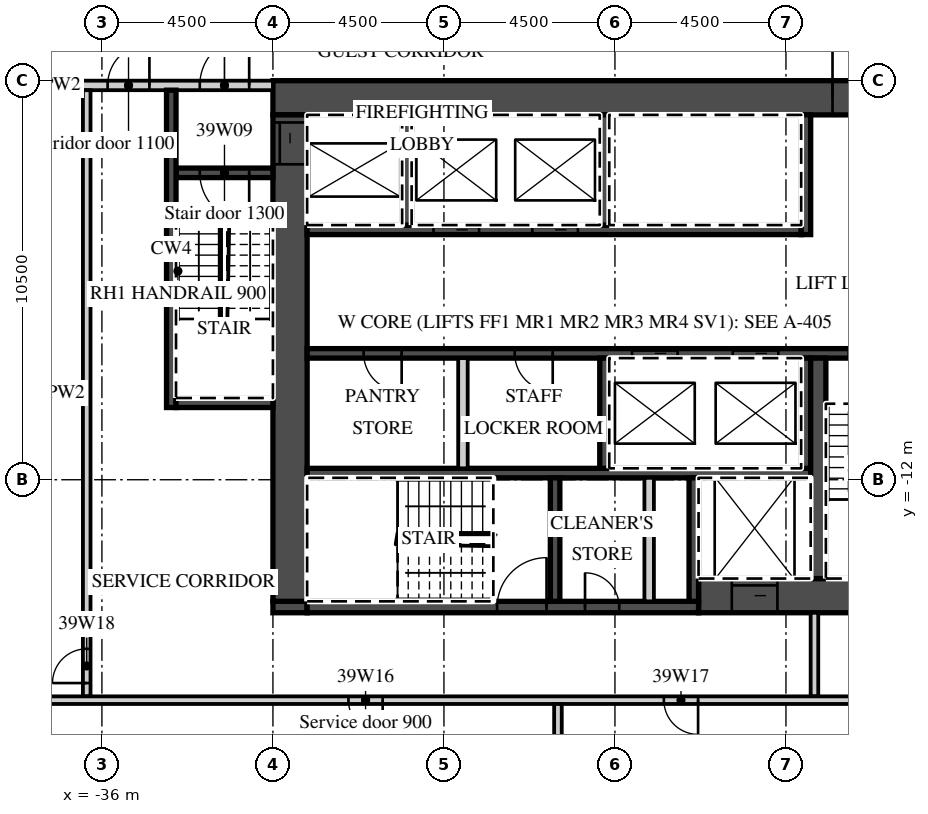
"""IFC4 building model, lengths in metres.
Left out: names, types, materials, properties, quantities, classifications, styles, units other than length and angle.
Written with IfcOpenShell. Run it as: python <this file> out.ifc"""

import sys

from ifc_helpers import new_model, si_unit, direction, frame, frame_2d, origin, place, context, subcontext, project, spatial, rectangle, extrude, element, fill, save


model = new_model("IFC4")
c1 = context("Model", 3, precision=1e-05, world=origin(), true_north=direction((0.0, 1.0)))
c2 = subcontext(c1, "Body", "Model", "MODEL_VIEW")
j1 = project(units=[si_unit("LENGTHUNIT", "METRE"), si_unit("PLANEANGLEUNIT", "RADIAN")], contexts=[c1])
p1 = place(None, origin())
s1 = spatial("IfcSite", under=j1, at=p1, CompositionType="ELEMENT")
p2 = place(p1, origin())
s2 = spatial("IfcBuilding", under=s1, at=p2, CompositionType="ELEMENT")
p3 = place(p2, frame((0.0, 0.0, 170.2)))
s3 = spatial("IfcBuildingStorey", under=s2, at=p3, CompositionType="ELEMENT", Elevation=170.2)
p4 = place(p3, frame((-31.5, -1.95, 0.0), z_axis=(0.0, 0.0, 1.0), x_axis=(1.0, 0.0, 0.0)))
e1 = element("IfcWall", 1, at=p4, inside=s3, PredefinedType="SHEAR", context=c2, shape_type="SweptSolid", body=[
    extrude(rectangle(XDim=18.0, YDim=0.9, at=frame_2d((9.0, 0.0))), origin(), (0.0, 0.0, 1.0), 3.02),
])
p5 = place(p4, frame((14.725, 0.0, 0.0)))
e2 = element("IfcOpeningElement", 2, at=p5, cuts=e1, PredefinedType="OPENING", context=c2, shape_type="SweptSolid", body=[
    extrude(rectangle(XDim=1.8, YDim=2.1, at=frame_2d((0.9, 1.05))), frame((0.0, 0.46, 0.0), z_axis=(0.0, -1.0, 0.0), x_axis=(1.0, 0.0, 0.0)), (0.0, 0.0, 1.0), 0.92),
])
p6 = place(p3, frame((-20.3, -15.05, 0.0), z_axis=(0.0, 0.0, 1.0), x_axis=(1.0, 0.0, 0.0)))
e3 = element("IfcWall", 3, at=p6, inside=s3, PredefinedType="SHEAR", context=c2, shape_type="SweptSolid", body=[
    extrude(rectangle(XDim=6.8, YDim=0.9, at=frame_2d((3.4, 0.0))), origin(), (0.0, 0.0, 1.0), 3.02),
])
p7 = place(p6, frame((0.875, 0.0, 0.0)))
e4 = element("IfcOpeningElement", 4, at=p7, cuts=e3, PredefinedType="OPENING", context=c2, shape_type="SweptSolid", body=[
    extrude(rectangle(XDim=1.2, YDim=2.1, at=frame_2d((0.6, 1.05))), frame((0.0, 0.46, 0.0), z_axis=(0.0, -1.0, 0.0), x_axis=(1.0, 0.0, 0.0)), (0.0, 0.0, 1.0), 0.92),
])
p8 = place(p3, frame((-31.5, -15.35, 0.0), z_axis=(0.0, 0.0, 1.0), x_axis=(1.0, 0.0, 0.0)))
e5 = element("IfcWall", 5, at=p8, inside=s3, PredefinedType="SHEAR", context=c2, shape_type="SweptSolid", body=[
    extrude(rectangle(XDim=0.9, YDim=0.3, at=frame_2d((0.45, 0.0))), origin(), (0.0, 0.0, 1.0), 3.02),
])
p9 = place(p3, frame((-30.6, -15.35, 0.0), z_axis=(0.0, 0.0, 1.0), x_axis=(1.0, 0.0, 0.0)))
e6 = element("IfcWall", 6, at=p9, inside=s3, PredefinedType="SHEAR", context=c2, shape_type="SweptSolid", body=[
    extrude(rectangle(XDim=10.3, YDim=0.3, at=frame_2d((5.15, 0.0))), origin(), (0.0, 0.0, 1.0), 3.02),
])
p10 = place(p9, frame((5.0, 0.0, 0.0)))
e7 = element("IfcOpeningElement", 7, at=p10, cuts=e6, PredefinedType="OPENING", context=c2, shape_type="SweptSolid", body=[
    extrude(rectangle(XDim=1.3, YDim=2.1, at=frame_2d((0.65, 1.05))), frame((0.0, 0.16, 0.0), z_axis=(0.0, -1.0, 0.0), x_axis=(1.0, 0.0, 0.0)), (0.0, 0.0, 1.0), 0.32),
])
p11 = place(p9, frame((7.312, 0.0, 0.0)))
e8 = element("IfcOpeningElement", 8, at=p11, cuts=e6, PredefinedType="OPENING", context=c2, shape_type="SweptSolid", body=[
    extrude(rectangle(XDim=0.9, YDim=2.1, at=frame_2d((0.45, 1.05))), frame((0.0, 0.16, 0.0), z_axis=(0.0, -1.0, 0.0), x_axis=(1.0, 0.0, 0.0)), (0.0, 0.0, 1.0), 0.32),
])
p12 = place(p3, frame((-31.05, -15.2, 0.0), z_axis=(0.0, 0.0, 1.0), x_axis=(0.0, 1.0, 0.0)))
e9 = element("IfcWall", 9, at=p12, inside=s3, PredefinedType="SHEAR", context=c2, shape_type="SweptSolid", body=[
    extrude(rectangle(XDim=12.8, YDim=0.9, at=frame_2d((6.4, 0.0))), origin(), (0.0, 0.0, 1.0), 3.02),
])
p13 = place(p12, frame((11.5, 0.0, 0.0)))
e10 = element("IfcOpeningElement", 10, at=p13, cuts=e9, PredefinedType="OPENING", context=c2, shape_type="SweptSolid", body=[
    extrude(rectangle(XDim=1.1, YDim=2.1, at=frame_2d((0.55, 1.05))), frame((0.0, 0.46, 0.0), z_axis=(0.0, -1.0, 0.0), x_axis=(1.0, 0.0, 0.0)), (0.0, 0.0, 1.0), 0.92),
])
p14 = place(p3, frame((-30.6, -5.425, 0.0), z_axis=(0.0, 0.0, 1.0), x_axis=(1.0, 0.0, 0.0)))
e11 = element("IfcWall", 11, at=p14, inside=s3, PredefinedType="SHEAR", context=c2, shape_type="SweptSolid", body=[
    extrude(rectangle(XDim=13.0, YDim=0.25, at=frame_2d((6.5, 0.0))), origin(), (0.0, 0.0, 1.0), 3.02),
])
p15 = place(p14, frame((3.325, 0.0, 0.0)))
e12 = element("IfcOpeningElement", 12, at=p15, cuts=e11, PredefinedType="OPENING", context=c2, shape_type="SweptSolid", body=[
    extrude(rectangle(XDim=1.2, YDim=2.1, at=frame_2d((0.6, 1.05))), frame((0.0, 0.135, 0.0), z_axis=(0.0, -1.0, 0.0), x_axis=(1.0, 0.0, 0.0)), (0.0, 0.0, 1.0), 0.27),
])
p16 = place(p14, frame((5.925, 0.0, 0.0)))
e13 = element("IfcOpeningElement", 13, at=p16, cuts=e11, PredefinedType="OPENING", context=c2, shape_type="SweptSolid", body=[
    extrude(rectangle(XDim=1.2, YDim=2.1, at=frame_2d((0.6, 1.05))), frame((0.0, 0.135, 0.0), z_axis=(0.0, -1.0, 0.0), x_axis=(1.0, 0.0, 0.0)), (0.0, 0.0, 1.0), 0.27),
])
p17 = place(p3, frame((-17.475, -5.55, 0.0), z_axis=(0.0, 0.0, 1.0), x_axis=(0.0, 1.0, 0.0)))
e14 = element("IfcWall", 14, at=p17, inside=s3, PredefinedType="SHEAR", context=c2, shape_type="SweptSolid", body=[
    extrude(rectangle(XDim=3.15, YDim=0.25, at=frame_2d((1.575, 0.0))), origin(), (0.0, 0.0, 1.0), 3.02),
])
for number, where, z_axis, x_axis in (
    (15, (-27.975, -5.3, 0.0), (0.0, 0.0, 1.0), (0.0, 1.0, 0.0)),
    (16, (-22.775, -5.3, 0.0), (0.0, 0.0, 1.0), (0.0, 1.0, 0.0)),
):
    element("IfcWall", number, at=place(p3, frame(where, z_axis=z_axis, x_axis=x_axis)), inside=s3, PredefinedType="SHEAR", context=c2, shape_type="SweptSolid", body=[
        extrude(rectangle(XDim=2.9, YDim=0.25, at=frame_2d((1.45, 0.0))), origin(), (0.0, 0.0, 1.0), 3.02),
    ])
p18 = place(p3, frame((-30.6, -8.675, 0.0), z_axis=(0.0, 0.0, 1.0), x_axis=(1.0, 0.0, 0.0)))
e17 = element("IfcWall", 17, at=p18, inside=s3, PredefinedType="SHEAR", context=c2, shape_type="SweptSolid", body=[
    extrude(rectangle(XDim=16.2, YDim=0.25, at=frame_2d((8.1, 0.0))), origin(), (0.0, 0.0, 1.0), 3.02),
])
p19 = place(p18, frame((8.55, 0.0, 0.0)))
e18 = element("IfcOpeningElement", 18, at=p19, cuts=e17, PredefinedType="OPENING", context=c2, shape_type="SweptSolid", body=[
    extrude(rectangle(XDim=1.2, YDim=2.1, at=frame_2d((0.6, 1.05))), frame((0.0, 0.135, 0.0), z_axis=(0.0, -1.0, 0.0), x_axis=(1.0, 0.0, 0.0)), (0.0, 0.0, 1.0), 0.27),
])
p20 = place(p18, frame((11.2, 0.0, 0.0)))
e19 = element("IfcOpeningElement", 19, at=p20, cuts=e17, PredefinedType="OPENING", context=c2, shape_type="SweptSolid", body=[
    extrude(rectangle(XDim=1.2, YDim=2.1, at=frame_2d((0.6, 1.05))), frame((0.0, 0.135, 0.0), z_axis=(0.0, -1.0, 0.0), x_axis=(1.0, 0.0, 0.0)), (0.0, 0.0, 1.0), 0.27),
])
p21 = place(p18, frame((14.25, 0.0, 0.0)))
e20 = element("IfcOpeningElement", 20, at=p21, cuts=e17, PredefinedType="OPENING", context=c2, shape_type="SweptSolid", body=[
    extrude(rectangle(XDim=1.3, YDim=2.1, at=frame_2d((0.65, 1.05))), frame((0.0, 0.135, 0.0), z_axis=(0.0, -1.0, 0.0), x_axis=(1.0, 0.0, 0.0)), (0.0, 0.0, 1.0), 0.27),
])
p22 = place(p18, frame((1.488, 0.0, 0.0)))
e21 = element("IfcOpeningElement", 21, at=p22, cuts=e17, PredefinedType="OPENING", context=c2, shape_type="SweptSolid", body=[
    extrude(rectangle(XDim=1.0, YDim=2.1, at=frame_2d((0.5, 1.05))), frame((0.0, 0.135, 0.0), z_axis=(0.0, -1.0, 0.0), x_axis=(1.0, 0.0, 0.0)), (0.0, 0.0, 1.0), 0.27),
])
p23 = place(p18, frame((5.462, 0.0, 0.0)))
e22 = element("IfcOpeningElement", 22, at=p23, cuts=e17, PredefinedType="OPENING", context=c2, shape_type="SweptSolid", body=[
    extrude(rectangle(XDim=1.0, YDim=2.1, at=frame_2d((0.5, 1.05))), frame((0.0, 0.135, 0.0), z_axis=(0.0, -1.0, 0.0), x_axis=(1.0, 0.0, 0.0)), (0.0, 0.0, 1.0), 0.27),
])
p24 = place(p3, frame((-30.6, -11.825, 0.0), z_axis=(0.0, 0.0, 1.0), x_axis=(1.0, 0.0, 0.0)))
e23 = element("IfcWall", 23, at=p24, inside=s3, PredefinedType="SHEAR", context=c2, shape_type="SweptSolid", body=[
    extrude(rectangle(XDim=13.25, YDim=0.25, at=frame_2d((6.625, 0.0))), origin(), (0.0, 0.0, 1.0), 3.02),
])
for number, where, z_axis, x_axis in (
    (24, (-17.475, -11.7, 0.0), (0.0, 0.0, 1.0), (0.0, 1.0, 0.0)),
    (25, (-22.775, -11.7, 0.0), (0.0, 0.0, 1.0), (0.0, 1.0, 0.0)),
):
    element("IfcWall", number, at=place(p3, frame(where, z_axis=z_axis, x_axis=x_axis)), inside=s3, PredefinedType="SHEAR", context=c2, shape_type="SweptSolid", body=[
        extrude(rectangle(XDim=2.9, YDim=0.25, at=frame_2d((1.45, 0.0))), origin(), (0.0, 0.0, 1.0), 3.02),
    ])
p25 = place(p3, frame((-26.5, -11.7, 0.0), z_axis=(0.0, 0.0, 1.0), x_axis=(0.0, 1.0, 0.0)))
e26 = element("IfcWall", 26, at=p25, inside=s3, PredefinedType="PARTITIONING", context=c2, shape_type="SweptSolid", body=[
    extrude(rectangle(XDim=2.9, YDim=0.25, at=frame_2d((1.45, 0.0))), origin(), (0.0, 0.0, 1.0), 3.02),
])
p26 = place(p3, frame((-17.15, -14.6, 0.0), z_axis=(0.0, 0.0, 1.0), x_axis=(0.0, 1.0, 0.0)))
e27 = element("IfcWall", 27, at=p26, inside=s3, PredefinedType="SHEAR", context=c2, shape_type="SweptSolid", body=[
    extrude(rectangle(XDim=5.8, YDim=0.4, at=frame_2d((2.9, 0.0))), origin(), (0.0, 0.0, 1.0), 3.02),
])
for number, where, z_axis, x_axis in (
    (28, (-20.425, -15.2, 0.0), (0.0, 0.0, 1.0), (0.0, 1.0, 0.0)),
    (29, (-24.075, -15.2, 0.0), (0.0, 0.0, 1.0), (0.0, 1.0, 0.0)),
):
    element("IfcWall", number, at=place(p3, frame(where, z_axis=z_axis, x_axis=x_axis)), inside=s3, PredefinedType="SHEAR", context=c2, shape_type="SweptSolid", body=[
        extrude(rectangle(XDim=3.25, YDim=0.25, at=frame_2d((1.625, 0.0))), origin(), (0.0, 0.0, 1.0), 3.02),
    ])
p27 = place(p3, frame((-21.6, -15.2, 0.0), z_axis=(0.0, 0.0, 1.0), x_axis=(0.0, 1.0, 0.0)))
e30 = element("IfcWall", 30, at=p27, inside=s3, PredefinedType="PARTITIONING", context=c2, shape_type="SweptSolid", body=[
    extrude(rectangle(XDim=3.25, YDim=0.25, at=frame_2d((1.625, 0.0))), origin(), (0.0, 0.0, 1.0), 3.02),
])
p28 = place(p3, frame((-42.632, -1.625, 0.0), z_axis=(0.0, 0.0, 1.0), x_axis=(1.0, 0.0, 0.0)))
e31 = element("IfcWall", 31, at=p28, inside=s3, PredefinedType="PARTITIONING", context=c2, shape_type="SweptSolid", body=[
    extrude(rectangle(XDim=11.132, YDim=0.25, at=frame_2d((5.566, 0.0))), origin(), (0.0, 0.0, 1.0), 3.02),
])
p29 = place(p28, frame((9.207, 0.0, 0.0)))
e32 = element("IfcOpeningElement", 32, at=p29, cuts=e31, PredefinedType="OPENING", context=c2, shape_type="SweptSolid", body=[
    extrude(rectangle(XDim=1.3, YDim=2.1, at=frame_2d((0.65, 1.05))), frame((0.0, 0.135, 0.0), z_axis=(0.0, -1.0, 0.0), x_axis=(1.0, 0.0, 0.0)), (0.0, 0.0, 1.0), 0.27),
])
p30 = place(p28, frame((6.781, 0.0, 0.0)))
e33 = element("IfcOpeningElement", 33, at=p30, cuts=e31, PredefinedType="OPENING", context=c2, shape_type="SweptSolid", body=[
    extrude(rectangle(XDim=1.1, YDim=2.1, at=frame_2d((0.55, 1.05))), frame((0.0, 0.135, 0.0), z_axis=(0.0, -1.0, 0.0), x_axis=(1.0, 0.0, 0.0)), (0.0, 0.0, 1.0), 0.27),
])
p31 = place(p3, frame((-34.05, -3.925, 0.0), z_axis=(0.0, 0.0, 1.0), x_axis=(1.0, 0.0, 0.0)))
e34 = element("IfcWall", 34, at=p31, inside=s3, PredefinedType="SHEAR", context=c2, shape_type="SweptSolid", body=[
    extrude(rectangle(XDim=2.55, YDim=0.25, at=frame_2d((1.275, 0.0))), origin(), (0.0, 0.0, 1.0), 3.02),
])
p32 = place(p31, frame((0.625, 0.0, 0.0)))
e35 = element("IfcOpeningElement", 35, at=p32, cuts=e34, PredefinedType="OPENING", context=c2, shape_type="SweptSolid", body=[
    extrude(rectangle(XDim=1.3, YDim=2.1, at=frame_2d((0.65, 1.05))), frame((0.0, 0.135, 0.0), z_axis=(0.0, -1.0, 0.0), x_axis=(1.0, 0.0, 0.0)), (0.0, 0.0, 1.0), 0.27),
])
p33 = place(p3, frame((-34.175, -10.1, 0.0), z_axis=(0.0, 0.0, 1.0), x_axis=(0.0, 1.0, 0.0)))
e36 = element("IfcWall", 36, at=p33, inside=s3, PredefinedType="SHEAR", context=c2, shape_type="SweptSolid", body=[
    extrude(rectangle(XDim=8.35, YDim=0.25, at=frame_2d((4.175, 0.0))), origin(), (0.0, 0.0, 1.0), 3.02),
])
p34 = place(p3, frame((-34.05, -9.975, 0.0), z_axis=(0.0, 0.0, 1.0), x_axis=(1.0, 0.0, 0.0)))
e37 = element("IfcWall", 37, at=p34, inside=s3, PredefinedType="SHEAR", context=c2, shape_type="SweptSolid", body=[
    extrude(rectangle(XDim=2.55, YDim=0.25, at=frame_2d((1.275, 0.0))), origin(), (0.0, 0.0, 1.0), 3.02),
])
p35 = place(p3, frame((-17.25, -17.7, 0.0), z_axis=(0.0, 0.0, 1.0), x_axis=(0.0, 1.0, 0.0)))
e38 = element("IfcWall", 38, at=p35, inside=s3, PredefinedType="PARTITIONING", context=c2, shape_type="SweptSolid", body=[
    extrude(rectangle(XDim=2.2, YDim=0.2, at=frame_2d((1.1, 0.0))), origin(), (0.0, 0.0, 1.0), 3.02),
])
p36 = place(p3, frame((-36.4, -17.7, 0.0), z_axis=(0.0, 0.0, 1.0), x_axis=(0.0, 1.0, 0.0)))
e39 = element("IfcWall", 39, at=p36, inside=s3, PredefinedType="PARTITIONING", context=c2, shape_type="SweptSolid", body=[
    extrude(rectangle(XDim=15.95, YDim=0.2, at=frame_2d((7.975, 0.0))), origin(), (0.0, 0.0, 1.0), 3.02),
])
p37 = place(p36, frame((0.35, 0.0, 0.0)))
e40 = element("IfcOpeningElement", 40, at=p37, cuts=e39, PredefinedType="OPENING", context=c2, shape_type="SweptSolid", body=[
    extrude(rectangle(XDim=0.9, YDim=2.1, at=frame_2d((0.45, 1.05))), frame((0.0, 0.11, 0.0), z_axis=(0.0, -1.0, 0.0), x_axis=(1.0, 0.0, 0.0)), (0.0, 0.0, 1.0), 0.22),
])
p38 = place(p3, frame((-41.074, -17.8, 0.0), z_axis=(0.0, 0.0, 1.0), x_axis=(1.0, 0.0, 0.0)))
e41 = element("IfcWall", 41, at=p38, inside=s3, PredefinedType="PARTITIONING", context=c2, shape_type="SweptSolid", body=[
    extrude(rectangle(XDim=27.474, YDim=0.2, at=frame_2d((13.737, 0.0))), origin(), (0.0, 0.0, 1.0), 3.02),
])
p39 = place(p38, frame((11.562, 0.0, 0.0)))
e42 = element("IfcOpeningElement", 42, at=p39, cuts=e41, PredefinedType="OPENING", context=c2, shape_type="SweptSolid", body=[
    extrude(rectangle(XDim=0.9, YDim=2.1, at=frame_2d((0.45, 1.05))), frame((0.0, 0.11, 0.0), z_axis=(0.0, -1.0, 0.0), x_axis=(1.0, 0.0, 0.0)), (0.0, 0.0, 1.0), 0.22),
])
p40 = place(p38, frame((19.862, 0.0, 0.0)))
e43 = element("IfcOpeningElement", 43, at=p40, cuts=e41, PredefinedType="OPENING", context=c2, shape_type="SweptSolid", body=[
    extrude(rectangle(XDim=0.9, YDim=2.1, at=frame_2d((0.45, 1.05))), frame((0.0, 0.11, 0.0), z_axis=(0.0, -1.0, 0.0), x_axis=(1.0, 0.0, 0.0)), (0.0, 0.0, 1.0), 0.22),
])
p41 = place(p3, frame((-24.0, -23.312, 0.0), z_axis=(0.0, 0.0, 1.0), x_axis=(0.0, 1.0, 0.0)))
e44 = element("IfcWall", 44, at=p41, inside=s3, PredefinedType="PARTITIONING", context=c2, shape_type="SweptSolid", body=[
    extrude(rectangle(XDim=5.413, YDim=0.2, at=frame_2d((2.706, 0.0))), origin(), (0.0, 0.0, 1.0), 3.02),
])
p42 = place(p19, origin())
e45 = element("IfcDoor", 45, at=p42, inside=s3, OperationType="SLIDING_TO_LEFT", PredefinedType="DOOR", context=c2, shape_type="SweptSolid", body=[
    extrude(rectangle(XDim=1.2, YDim=2.1, at=frame_2d((0.6, 1.05))), frame((0.0, 0.025, 0.0), z_axis=(0.0, -1.0, 0.0), x_axis=(1.0, 0.0, 0.0)), (0.0, 0.0, 1.0), 0.05),
])
fill(e18, e45)
p43 = place(p20, origin())
e46 = element("IfcDoor", 46, at=p43, inside=s3, OperationType="SLIDING_TO_RIGHT", PredefinedType="DOOR", context=c2, shape_type="SweptSolid", body=[
    extrude(rectangle(XDim=1.2, YDim=2.1, at=frame_2d((0.6, 1.05))), frame((0.0, 0.025, 0.0), z_axis=(0.0, -1.0, 0.0), x_axis=(1.0, 0.0, 0.0)), (0.0, 0.0, 1.0), 0.05),
])
fill(e19, e46)
p44 = place(p15, origin())
e47 = element("IfcDoor", 47, at=p44, inside=s3, OperationType="SLIDING_TO_RIGHT", PredefinedType="DOOR", context=c2, shape_type="SweptSolid", body=[
    extrude(rectangle(XDim=1.2, YDim=2.1, at=frame_2d((0.6, 1.05))), frame((0.0, 0.025, 0.0), z_axis=(0.0, -1.0, 0.0), x_axis=(1.0, 0.0, 0.0)), (0.0, 0.0, 1.0), 0.05),
])
fill(e12, e47)
p45 = place(p16, origin())
e48 = element("IfcDoor", 48, at=p45, inside=s3, OperationType="SLIDING_TO_RIGHT", PredefinedType="DOOR", context=c2, shape_type="SweptSolid", body=[
    extrude(rectangle(XDim=1.2, YDim=2.1, at=frame_2d((0.6, 1.05))), frame((0.0, 0.025, 0.0), z_axis=(0.0, -1.0, 0.0), x_axis=(1.0, 0.0, 0.0)), (0.0, 0.0, 1.0), 0.05),
])
fill(e13, e48)
p46 = place(p7, origin())
e49 = element("IfcDoor", 49, at=p46, inside=s3, OperationType="SLIDING_TO_LEFT", PredefinedType="DOOR", context=c2, shape_type="SweptSolid", body=[
    extrude(rectangle(XDim=1.2, YDim=2.1, at=frame_2d((0.6, 1.05))), frame((0.0, 0.025, 0.0), z_axis=(0.0, -1.0, 0.0), x_axis=(1.0, 0.0, 0.0)), (0.0, 0.0, 1.0), 0.05),
])
fill(e4, e49)
p47 = place(p13, origin())
e50 = element("IfcDoor", 50, at=p47, inside=s3, OperationType="SLIDING_TO_RIGHT", PredefinedType="DOOR", context=c2, shape_type="SweptSolid", body=[
    extrude(rectangle(XDim=1.1, YDim=2.1, at=frame_2d((0.55, 1.05))), frame((0.0, 0.025, 0.0), z_axis=(0.0, -1.0, 0.0), x_axis=(1.0, 0.0, 0.0)), (0.0, 0.0, 1.0), 0.05),
])
fill(e10, e50)
p48 = place(p5, origin())
e51 = element("IfcDoor", 51, at=p48, inside=s3, OperationType="DOUBLE_DOOR_DOUBLE_SWING", PredefinedType="DOOR", context=c2, shape_type="SweptSolid", body=[
    extrude(rectangle(XDim=1.8, YDim=2.1, at=frame_2d((0.9, 1.05))), frame((0.0, 0.025, 0.0), z_axis=(0.0, -1.0, 0.0), x_axis=(1.0, 0.0, 0.0)), (0.0, 0.0, 1.0), 0.05),
])
fill(e2, e51)
p49 = place(p29, origin())
e52 = element("IfcDoor", 52, at=p49, inside=s3, OperationType="SINGLE_SWING_RIGHT", PredefinedType="DOOR", context=c2, shape_type="SweptSolid", body=[
    extrude(rectangle(XDim=1.3, YDim=2.1, at=frame_2d((0.65, 1.05))), frame((0.0, 0.025, 0.0), z_axis=(0.0, -1.0, 0.0), x_axis=(1.0, 0.0, 0.0)), (0.0, 0.0, 1.0), 0.05),
])
fill(e32, e52)
p50 = place(p32, origin())
e53 = element("IfcDoor", 53, at=p50, inside=s3, OperationType="SINGLE_SWING_RIGHT", PredefinedType="DOOR", context=c2, shape_type="SweptSolid", body=[
    extrude(rectangle(XDim=1.3, YDim=2.1, at=frame_2d((0.65, 1.05))), frame((0.0, 0.025, 0.0), z_axis=(0.0, -1.0, 0.0), x_axis=(1.0, 0.0, 0.0)), (0.0, 0.0, 1.0), 0.05),
])
fill(e35, e53)
p51 = place(p30, origin())
e54 = element("IfcDoor", 54, at=p51, inside=s3, OperationType="SINGLE_SWING_RIGHT", PredefinedType="DOOR", context=c2, shape_type="SweptSolid", body=[
    extrude(rectangle(XDim=1.1, YDim=2.1, at=frame_2d((0.55, 1.05))), frame((0.0, 0.025, 0.0), z_axis=(0.0, -1.0, 0.0), x_axis=(1.0, 0.0, 0.0)), (0.0, 0.0, 1.0), 0.05),
])
fill(e33, e54)
p52 = place(p21, origin())
e55 = element("IfcDoor", 55, at=p52, inside=s3, OperationType="SINGLE_SWING_RIGHT", PredefinedType="DOOR", context=c2, shape_type="SweptSolid", body=[
    extrude(rectangle(XDim=1.3, YDim=2.1, at=frame_2d((0.65, 1.05))), frame((0.0, 0.025, 0.0), z_axis=(0.0, -1.0, 0.0), x_axis=(1.0, 0.0, 0.0)), (0.0, 0.0, 1.0), 0.05),
])
fill(e20, e55)
p53 = place(p10, origin())
e56 = element("IfcDoor", 56, at=p53, inside=s3, OperationType="SINGLE_SWING_RIGHT", PredefinedType="DOOR", context=c2, shape_type="SweptSolid", body=[
    extrude(rectangle(XDim=1.3, YDim=2.1, at=frame_2d((0.65, 1.05))), frame((0.0, 0.025, 0.0), z_axis=(0.0, -1.0, 0.0), x_axis=(1.0, 0.0, 0.0)), (0.0, 0.0, 1.0), 0.05),
])
fill(e7, e56)
p54 = place(p11, origin())
e57 = element("IfcDoor", 57, at=p54, inside=s3, OperationType="SINGLE_SWING_LEFT", PredefinedType="DOOR", context=c2, shape_type="SweptSolid", body=[
    extrude(rectangle(XDim=0.9, YDim=2.1, at=frame_2d((0.45, 1.05))), frame((0.0, 0.025, 0.0), z_axis=(0.0, -1.0, 0.0), x_axis=(1.0, 0.0, 0.0)), (0.0, 0.0, 1.0), 0.05),
])
fill(e8, e57)
p55 = place(p22, origin())
e58 = element("IfcDoor", 58, at=p55, inside=s3, OperationType="SINGLE_SWING_RIGHT", PredefinedType="DOOR", context=c2, shape_type="SweptSolid", body=[
    extrude(rectangle(XDim=1.0, YDim=2.1, at=frame_2d((0.5, 1.05))), frame((0.0, 0.025, 0.0), z_axis=(0.0, -1.0, 0.0), x_axis=(1.0, 0.0, 0.0)), (0.0, 0.0, 1.0), 0.05),
])
fill(e21, e58)
p56 = place(p23, origin())
e59 = element("IfcDoor", 59, at=p56, inside=s3, OperationType="SINGLE_SWING_RIGHT", PredefinedType="DOOR", context=c2, shape_type="SweptSolid", body=[
    extrude(rectangle(XDim=1.0, YDim=2.1, at=frame_2d((0.5, 1.05))), frame((0.0, 0.025, 0.0), z_axis=(0.0, -1.0, 0.0), x_axis=(1.0, 0.0, 0.0)), (0.0, 0.0, 1.0), 0.05),
])
fill(e22, e59)
p57 = place(p39, origin())
e60 = element("IfcDoor", 60, at=p57, inside=s3, OperationType="SINGLE_SWING_RIGHT", PredefinedType="DOOR", context=c2, shape_type="SweptSolid", body=[
    extrude(rectangle(XDim=0.9, YDim=2.1, at=frame_2d((0.45, 1.05))), frame((0.0, 0.025, 0.0), z_axis=(0.0, -1.0, 0.0), x_axis=(1.0, 0.0, 0.0)), (0.0, 0.0, 1.0), 0.05),
])
fill(e42, e60)
p58 = place(p40, origin())
e61 = element("IfcDoor", 61, at=p58, inside=s3, OperationType="SINGLE_SWING_RIGHT", PredefinedType="DOOR", context=c2, shape_type="SweptSolid", body=[
    extrude(rectangle(XDim=0.9, YDim=2.1, at=frame_2d((0.45, 1.05))), frame((0.0, 0.025, 0.0), z_axis=(0.0, -1.0, 0.0), x_axis=(1.0, 0.0, 0.0)), (0.0, 0.0, 1.0), 0.05),
])
fill(e43, e61)
p59 = place(p37, origin())
e62 = element("IfcDoor", 62, at=p59, inside=s3, OperationType="SINGLE_SWING_LEFT", PredefinedType="DOOR", context=c2, shape_type="SweptSolid", body=[
    extrude(rectangle(XDim=0.9, YDim=2.1, at=frame_2d((0.45, 1.05))), frame((0.0, 0.025, 0.0), z_axis=(0.0, -1.0, 0.0), x_axis=(1.0, 0.0, 0.0)), (0.0, 0.0, 1.0), 0.05),
])
fill(e40, e62)
save(model, sys.argv[1])
